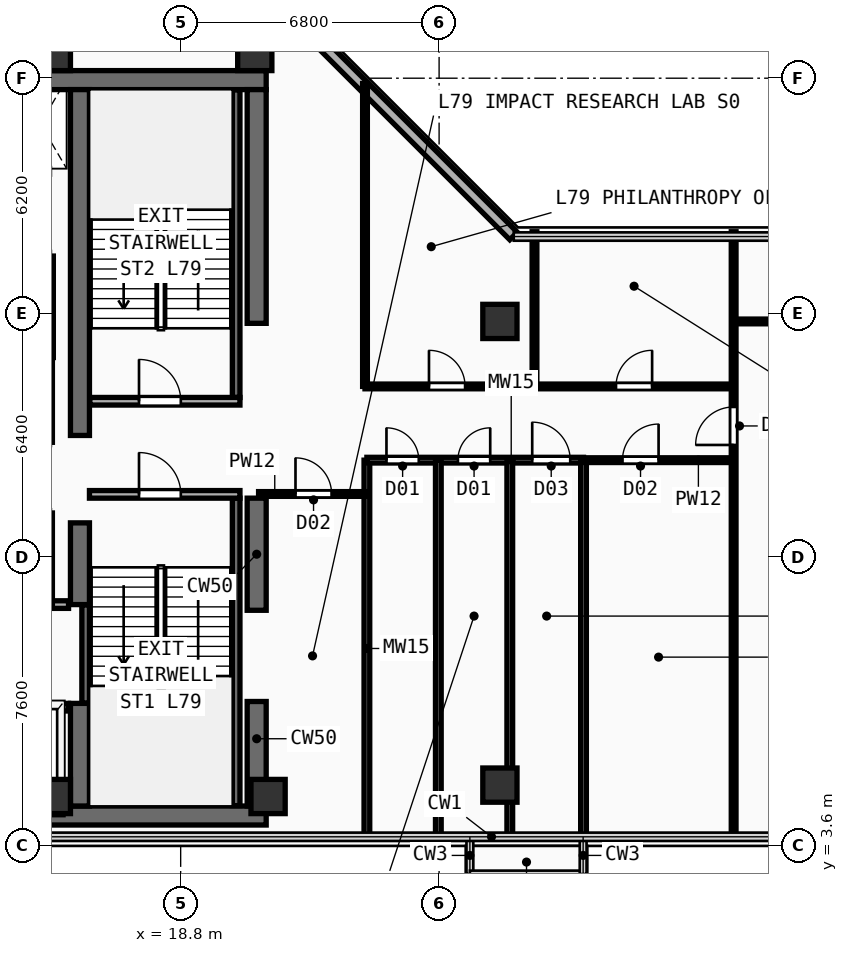
"""IFC4 building model, lengths in metres.
Left out: names, types, materials, properties, quantities, classifications, styles, units other than length and angle.
Written with IfcOpenShell. Run it as: python <this file> out.ifc"""

import sys

from ifc_helpers import new_model, si_unit, direction, frame, frame_2d, origin, origin_2d, place, context, subcontext, project, spatial, rectangle, extrude, element, fill, save


model = new_model("IFC4")
c1 = context("Model", 3, precision=1e-05, world=origin(), true_north=direction((0.0, 1.0)))
c2 = subcontext(c1, "Body", "Model", "MODEL_VIEW")
j1 = project(units=[si_unit("LENGTHUNIT", "METRE"), si_unit("PLANEANGLEUNIT", "RADIAN")], contexts=[c1])
p1 = place(None, origin())
s1 = spatial("IfcSite", under=j1, at=p1, CompositionType="ELEMENT")
p2 = place(p1, origin())
s2 = spatial("IfcBuilding", under=s1, at=p2, CompositionType="ELEMENT")
p3 = place(p2, frame((0.0, 0.0, 308.4)))
s3 = spatial("IfcBuildingStorey", under=s2, at=p3, CompositionType="ELEMENT", Elevation=308.4)
for number, where, z_axis, x_axis in (
    (1, (7.2, 4.4, 0.0), (0.0, 0.0, 1.0), (1.0, 0.0, 0.0)),
    (2, (7.2, 23.75, 0.0), (0.0, 0.0, 1.0), (1.0, 0.0, 0.0)),
):
    element("IfcWall", number, at=place(p3, frame(where, z_axis=z_axis, x_axis=x_axis)), inside=s3, PredefinedType="SHEAR", context=c2, shape_type="SweptSolid", body=[
        extrude(rectangle(XDim=13.85, YDim=0.5, at=frame_2d((6.925, 0.0))), origin(), (0.0, 0.0, 1.0), 3.56),
    ])
p4 = place(p3, frame((20.8, 4.65, 0.0), z_axis=(0.0, 0.0, 1.0), x_axis=(0.0, 1.0, 0.0)))
e3 = element("IfcWall", 3, at=p4, inside=s3, PredefinedType="SHEAR", context=c2, shape_type="SweptSolid", body=[
    extrude(rectangle(XDim=2.75, YDim=0.5, at=frame_2d((1.375, 0.0))), origin(), (0.0, 0.0, 1.0), 3.56),
])
p5 = place(p3, frame((20.8, 9.8, 0.0), z_axis=(0.0, 0.0, 1.0), x_axis=(0.0, 1.0, 0.0)))
e4 = element("IfcWall", 4, at=p5, inside=s3, PredefinedType="SHEAR", context=c2, shape_type="SweptSolid", body=[
    extrude(rectangle(XDim=2.95, YDim=0.5, at=frame_2d((1.475, 0.0))), origin(), (0.0, 0.0, 1.0), 3.56),
])
p6 = place(p3, frame((20.8, 17.35, 0.0), z_axis=(0.0, 0.0, 1.0), x_axis=(0.0, 1.0, 0.0)))
e5 = element("IfcWall", 5, at=p6, inside=s3, PredefinedType="SHEAR", context=c2, shape_type="SweptSolid", body=[
    extrude(rectangle(XDim=6.15, YDim=0.5, at=frame_2d((3.075, 0.0))), origin(), (0.0, 0.0, 1.0), 3.56),
])
p7 = place(p3, frame((16.15, 4.65, 0.0), z_axis=(0.0, 0.0, 1.0), x_axis=(0.0, 1.0, 0.0)))
e6 = element("IfcWall", 6, at=p7, inside=s3, PredefinedType="SHEAR", context=c2, shape_type="SweptSolid", body=[
    extrude(rectangle(XDim=2.7, YDim=0.5, at=frame_2d((1.35, 0.0))), origin(), (0.0, 0.0, 1.0), 3.56),
])
p8 = place(p3, frame((16.15, 9.95, 0.0), z_axis=(0.0, 0.0, 1.0), x_axis=(0.0, 1.0, 0.0)))
e7 = element("IfcWall", 7, at=p8, inside=s3, PredefinedType="SHEAR", context=c2, shape_type="SweptSolid", body=[
    extrude(rectangle(XDim=2.15, YDim=0.5, at=frame_2d((1.075, 0.0))), origin(), (0.0, 0.0, 1.0), 3.56),
])
p9 = place(p3, frame((16.15, 14.4, 0.0), z_axis=(0.0, 0.0, 1.0), x_axis=(0.0, 1.0, 0.0)))
e8 = element("IfcWall", 8, at=p9, inside=s3, PredefinedType="SHEAR", context=c2, shape_type="SweptSolid", body=[
    extrude(rectangle(XDim=9.1, YDim=0.5, at=frame_2d((4.55, 0.0))), origin(), (0.0, 0.0, 1.0), 3.56),
])
for number, where, z_axis, x_axis in (
    (9, (15.45, 4.9, 0.0), (0.0, 0.0, 1.0), (1.0, 0.0, 0.0)),
    (10, (21.1, 4.9, 0.0), (0.0, 0.0, 1.0), (1.0, 0.0, 0.0)),
    (11, (15.45, 24.45, 0.0), (0.0, 0.0, 1.0), (1.0, 0.0, 0.0)),
    (12, (20.75, 24.45, 0.0), (0.0, 0.0, 1.0), (1.0, 0.0, 0.0)),
    (13, (27.2, 5.2, 0.0), (0.0, 0.0, 1.0), (1.0, 0.0, 0.0)),
    (14, (27.2, 17.4, 0.0), (0.0, 0.0, 1.0), (1.0, 0.0, 0.0)),
):
    element("IfcColumn", number, at=place(p3, frame(where, z_axis=z_axis, x_axis=x_axis)), inside=s3, PredefinedType="COLUMN", context=c2, shape_type="SweptSolid", body=[
        extrude(rectangle(XDim=0.9, YDim=0.9, at=origin_2d()), origin(), (0.0, 0.0, 1.0), 3.56),
    ])
p10 = place(p3, frame((27.559, 19.649, 0.0), z_axis=(0.0, 0.0, 1.0), x_axis=(-0.707106781187, 0.707106781187, 0.0)))
e15 = element("IfcWall", 15, at=p10, inside=s3, PredefinedType="SOLIDWALL", context=c2, shape_type="SweptSolid", body=[
    extrude(rectangle(XDim=9.207, YDim=0.28, at=frame_2d((4.603, 0.0))), origin(), (0.0, 0.0, 1.0), 3.56),
])
p11 = place(p3, frame((16.3, 7.36, 0.0), z_axis=(0.0, 0.0, 1.0), x_axis=(0.0, 1.0, 0.0)))
e16 = element("IfcWall", 16, at=p11, inside=s3, PredefinedType="SHEAR", context=c2, shape_type="SweptSolid", body=[
    extrude(rectangle(XDim=2.58, YDim=0.2, at=frame_2d((1.29, 0.0))), origin(), (0.0, 0.0, 1.0), 3.56),
])
p12 = place(p3, frame((20.26, 4.66, 0.0), z_axis=(0.0, 0.0, 1.0), x_axis=(0.0, 1.0, 0.0)))
e17 = element("IfcWall", 17, at=p12, inside=s3, PredefinedType="SHEAR", context=c2, shape_type="SweptSolid", body=[
    extrude(rectangle(XDim=8.09, YDim=0.2, at=frame_2d((4.045, 0.0))), origin(), (0.0, 0.0, 1.0), 3.56),
])
p13 = place(p3, frame((16.4, 12.85, 0.0), z_axis=(0.0, 0.0, 1.0), x_axis=(1.0, 0.0, 0.0)))
e18 = element("IfcWall", 18, at=p13, inside=s3, PredefinedType="PARTITIONING", context=c2, shape_type="SweptSolid", body=[
    extrude(rectangle(XDim=3.96, YDim=0.2, at=frame_2d((1.98, 0.0))), origin(), (0.0, 0.0, 1.0), 3.56),
])
p14 = place(p13, frame((1.304, 0.0, 0.0)))
e19 = element("IfcOpeningElement", 19, at=p14, cuts=e18, PredefinedType="OPENING", context=c2, shape_type="SweptSolid", body=[
    extrude(rectangle(XDim=1.1, YDim=2.2, at=frame_2d((0.55, 1.1))), frame((0.0, 0.11, 0.0), z_axis=(0.0, -1.0, 0.0), x_axis=(1.0, 0.0, 0.0)), (0.0, 0.0, 1.0), 0.22),
])
p15 = place(p3, frame((20.26, 15.4, 0.0), z_axis=(0.0, 0.0, 1.0), x_axis=(0.0, 1.0, 0.0)))
e20 = element("IfcWall", 20, at=p15, inside=s3, PredefinedType="SHEAR", context=c2, shape_type="SweptSolid", body=[
    extrude(rectangle(XDim=8.09, YDim=0.2, at=frame_2d((4.045, 0.0))), origin(), (0.0, 0.0, 1.0), 3.56),
])
p16 = place(p3, frame((16.41, 15.3, 0.0), z_axis=(0.0, 0.0, 1.0), x_axis=(1.0, 0.0, 0.0)))
e21 = element("IfcWall", 21, at=p16, inside=s3, PredefinedType="PARTITIONING", context=c2, shape_type="SweptSolid", body=[
    extrude(rectangle(XDim=3.95, YDim=0.2, at=frame_2d((1.975, 0.0))), origin(), (0.0, 0.0, 1.0), 3.56),
])
p17 = place(p16, frame((1.294, 0.0, 0.0)))
e22 = element("IfcOpeningElement", 22, at=p17, cuts=e21, PredefinedType="OPENING", context=c2, shape_type="SweptSolid", body=[
    extrude(rectangle(XDim=1.1, YDim=2.2, at=frame_2d((0.55, 1.1))), frame((0.0, 0.11, 0.0), z_axis=(0.0, -1.0, 0.0), x_axis=(1.0, 0.0, 0.0)), (0.0, 0.0, 1.0), 0.22),
])
p18 = place(p3, frame((7.5, 7.25, 0.0), z_axis=(0.0, 0.0, 1.0), x_axis=(1.0, 0.0, 0.0)))
e23 = element("IfcWall", 23, at=p18, inside=s3, PredefinedType="PARTITIONING", context=c2, shape_type="SweptSolid", body=[
    extrude(rectangle(XDim=8.35, YDim=0.2, at=frame_2d((4.175, 0.0))), origin(), (0.0, 0.0, 1.0), 3.56),
])
p19 = place(p18, frame((0.53, 0.0, 0.0)))
e24 = element("IfcOpeningElement", 24, at=p19, cuts=e23, PredefinedType="OPENING", context=c2, shape_type="SweptSolid", body=[
    extrude(rectangle(XDim=1.1, YDim=2.2, at=frame_2d((0.55, 1.1))), frame((0.0, 0.11, 0.0), z_axis=(0.0, -1.0, 0.0), x_axis=(1.0, 0.0, 0.0)), (0.0, 0.0, 1.0), 0.22),
])
p20 = place(p18, frame((2.37, 0.0, 0.0)))
e25 = element("IfcOpeningElement", 25, at=p20, cuts=e23, PredefinedType="OPENING", context=c2, shape_type="SweptSolid", body=[
    extrude(rectangle(XDim=1.1, YDim=2.2, at=frame_2d((0.55, 1.1))), frame((0.0, 0.11, 0.0), z_axis=(0.0, -1.0, 0.0), x_axis=(1.0, 0.0, 0.0)), (0.0, 0.0, 1.0), 0.22),
])
p21 = place(p18, frame((4.33, 0.0, 0.0)))
e26 = element("IfcOpeningElement", 26, at=p21, cuts=e23, PredefinedType="OPENING", context=c2, shape_type="SweptSolid", body=[
    extrude(rectangle(XDim=1.1, YDim=2.2, at=frame_2d((0.55, 1.1))), frame((0.0, 0.11, 0.0), z_axis=(0.0, -1.0, 0.0), x_axis=(1.0, 0.0, 0.0)), (0.0, 0.0, 1.0), 0.22),
])
p22 = place(p18, frame((6.5, 0.0, 0.0)))
e27 = element("IfcOpeningElement", 27, at=p22, cuts=e23, PredefinedType="OPENING", context=c2, shape_type="SweptSolid", body=[
    extrude(rectangle(XDim=1.1, YDim=2.2, at=frame_2d((0.55, 1.1))), frame((0.0, 0.11, 0.0), z_axis=(0.0, -1.0, 0.0), x_axis=(1.0, 0.0, 0.0)), (0.0, 0.0, 1.0), 0.22),
])
p23 = place(p3, frame((7.5, 9.95, 0.0), z_axis=(0.0, 0.0, 1.0), x_axis=(1.0, 0.0, 0.0)))
e28 = element("IfcWall", 28, at=p23, inside=s3, PredefinedType="PARTITIONING", context=c2, shape_type="SweptSolid", body=[
    extrude(rectangle(XDim=8.35, YDim=0.2, at=frame_2d((4.175, 0.0))), origin(), (0.0, 0.0, 1.0), 3.56),
])
p24 = place(p3, frame((15.35, 9.95, 0.0), z_axis=(0.0, 0.0, 1.0), x_axis=(0.0, 1.0, 0.0)))
e29 = element("IfcWall", 29, at=p24, inside=s3, PredefinedType="PARTITIONING", context=c2, shape_type="SweptSolid", body=[
    extrude(rectangle(XDim=2.41, YDim=0.15, at=frame_2d((1.205, 0.0))), origin(), (0.0, 0.0, 1.0), 3.56),
])
p25 = place(p3, frame((15.35, 14.22, 0.0), z_axis=(0.0, 0.0, 1.0), x_axis=(0.0, 1.0, 0.0)))
e30 = element("IfcWall", 30, at=p25, inside=s3, PredefinedType="PARTITIONING", context=c2, shape_type="SweptSolid", body=[
    extrude(rectangle(XDim=2.23, YDim=0.15, at=frame_2d((1.115, 0.0))), origin(), (0.0, 0.0, 1.0), 3.56),
])
p26 = place(p3, frame((15.35, 16.45, 0.0), z_axis=(0.0, 0.0, 1.0), x_axis=(0.0, 1.0, 0.0)))
e31 = element("IfcWall", 31, at=p26, inside=s3, PredefinedType="PARTITIONING", context=c2, shape_type="SweptSolid", body=[
    extrude(rectangle(XDim=2.67, YDim=0.2, at=frame_2d((1.335, 0.0))), origin(), (0.0, 0.0, 1.0), 3.56),
])
p27 = place(p3, frame((23.7, 3.84, 0.0), z_axis=(0.0, 0.0, 1.0), x_axis=(0.0, 1.0, 0.0)))
e32 = element("IfcWall", 32, at=p27, inside=s3, PredefinedType="PLUMBINGWALL", context=c2, shape_type="SweptSolid", body=[
    extrude(rectangle(XDim=9.91, YDim=0.15, at=frame_2d((4.955, 0.0))), origin(), (0.0, 0.0, 1.0), 3.56),
])
p28 = place(p3, frame((23.7, 13.75, 0.0), z_axis=(0.0, 0.0, 1.0), x_axis=(1.0, 0.0, 0.0)))
e33 = element("IfcWall", 33, at=p28, inside=s3, PredefinedType="PLUMBINGWALL", context=c2, shape_type="SweptSolid", body=[
    extrude(rectangle(XDim=5.7, YDim=0.15, at=frame_2d((2.85, 0.0))), origin(), (0.0, 0.0, 1.0), 3.26),
])
p29 = place(p28, frame((0.515, 0.0, 0.0)))
e34 = element("IfcOpeningElement", 34, at=p29, cuts=e33, PredefinedType="OPENING", context=c2, shape_type="SweptSolid", body=[
    extrude(rectangle(XDim=0.85, YDim=2.15, at=frame_2d((0.425, 1.075))), frame((0.0, 0.085, 0.0), z_axis=(0.0, -1.0, 0.0), x_axis=(1.0, 0.0, 0.0)), (0.0, 0.0, 1.0), 0.17),
])
p30 = place(p28, frame((2.395, 0.0, 0.0)))
e35 = element("IfcOpeningElement", 35, at=p30, cuts=e33, PredefinedType="OPENING", context=c2, shape_type="SweptSolid", body=[
    extrude(rectangle(XDim=0.85, YDim=2.15, at=frame_2d((0.425, 1.075))), frame((0.0, 0.085, 0.0), z_axis=(0.0, -1.0, 0.0), x_axis=(1.0, 0.0, 0.0)), (0.0, 0.0, 1.0), 0.17),
])
p31 = place(p28, frame((4.35, 0.0, 0.0)))
e36 = element("IfcOpeningElement", 36, at=p31, cuts=e33, PredefinedType="OPENING", context=c2, shape_type="SweptSolid", body=[
    extrude(rectangle(XDim=1.0, YDim=2.2, at=frame_2d((0.5, 1.1))), frame((0.0, 0.085, 0.0), z_axis=(0.0, -1.0, 0.0), x_axis=(1.0, 0.0, 0.0)), (0.0, 0.0, 1.0), 0.17),
])
p32 = place(p3, frame((25.58, 3.84, 0.0), z_axis=(0.0, 0.0, 1.0), x_axis=(0.0, 1.0, 0.0)))
e37 = element("IfcWall", 37, at=p32, inside=s3, PredefinedType="PLUMBINGWALL", context=c2, shape_type="SweptSolid", body=[
    extrude(rectangle(XDim=9.91, YDim=0.15, at=frame_2d((4.955, 0.0))), origin(), (0.0, 0.0, 1.0), 3.56),
])
p33 = place(p3, frame((27.46, 3.84, 0.0), z_axis=(0.0, 0.0, 1.0), x_axis=(0.0, 1.0, 0.0)))
e38 = element("IfcWall", 38, at=p33, inside=s3, PredefinedType="PLUMBINGWALL", context=c2, shape_type="SweptSolid", body=[
    extrude(rectangle(XDim=9.91, YDim=0.15, at=frame_2d((4.955, 0.0))), origin(), (0.0, 0.0, 1.0), 2.96),
])
p34 = place(p3, frame((29.4, 3.84, 0.0), z_axis=(0.0, 0.0, 1.0), x_axis=(0.0, 1.0, 0.0)))
e39 = element("IfcWall", 39, at=p34, inside=s3, PredefinedType="PLUMBINGWALL", context=c2, shape_type="SweptSolid", body=[
    extrude(rectangle(XDim=9.91, YDim=0.15, at=frame_2d((4.955, 0.0))), origin(), (0.0, 0.0, 1.0), 3.56),
])
p35 = place(p3, frame((20.85, 12.86, 0.0), z_axis=(0.0, 0.0, 1.0), x_axis=(1.0, 0.0, 0.0)))
e40 = element("IfcWall", 40, at=p35, inside=s3, PredefinedType="PARTITIONING", context=c2, shape_type="SweptSolid", body=[
    extrude(rectangle(XDim=2.85, YDim=0.125, at=frame_2d((1.425, 0.0))), origin(), (0.0, 0.0, 1.0), 3.56),
])
p36 = place(p35, frame((0.971, 0.0, 0.0)))
e41 = element("IfcOpeningElement", 41, at=p36, cuts=e40, PredefinedType="OPENING", context=c2, shape_type="SweptSolid", body=[
    extrude(rectangle(XDim=0.95, YDim=2.15, at=frame_2d((0.475, 1.075))), frame((0.0, 0.073, 0.0), z_axis=(0.0, -1.0, 0.0), x_axis=(1.0, 0.0, 0.0)), (0.0, 0.0, 1.0), 0.145),
])
p37 = place(p3, frame((29.4, 13.75, 0.0), z_axis=(0.0, 0.0, 1.0), x_axis=(1.0, 0.0, 0.0)))
e42 = element("IfcWall", 42, at=p37, inside=s3, PredefinedType="PARTITIONING", context=c2, shape_type="SweptSolid", body=[
    extrude(rectangle(XDim=3.95, YDim=0.125, at=frame_2d((1.975, 0.0))), origin(), (0.0, 0.0, 1.0), 3.26),
])
p38 = place(p37, frame((1.025, 0.0, 0.0)))
e43 = element("IfcOpeningElement", 43, at=p38, cuts=e42, PredefinedType="OPENING", context=c2, shape_type="SweptSolid", body=[
    extrude(rectangle(XDim=0.95, YDim=2.15, at=frame_2d((0.475, 1.075))), frame((0.0, 0.073, 0.0), z_axis=(0.0, -1.0, 0.0), x_axis=(1.0, 0.0, 0.0)), (0.0, 0.0, 1.0), 0.145),
])
p39 = place(p3, frame((33.35, 3.84, 0.0), z_axis=(0.0, 0.0, 1.0), x_axis=(0.0, 1.0, 0.0)))
e44 = element("IfcWall", 44, at=p39, inside=s3, PredefinedType="PARTITIONING", context=c2, shape_type="SweptSolid", body=[
    extrude(rectangle(XDim=15.92, YDim=0.125, at=frame_2d((7.96, 0.0))), origin(), (0.0, 0.0, 1.0), 3.56),
])
p40 = place(p39, frame((10.31, 0.0, 0.0)))
e45 = element("IfcOpeningElement", 45, at=p40, cuts=e44, PredefinedType="OPENING", context=c2, shape_type="SweptSolid", body=[
    extrude(rectangle(XDim=1.0, YDim=2.2, at=frame_2d((0.5, 1.1))), frame((0.0, 0.073, 0.0), z_axis=(0.0, -1.0, 0.0), x_axis=(1.0, 0.0, 0.0)), (0.0, 0.0, 1.0), 0.145),
])
p41 = place(p3, frame((33.35, 17.4, 0.0), z_axis=(0.0, 0.0, 1.0), x_axis=(1.0, 0.0, 0.0)))
e46 = element("IfcWall", 46, at=p41, inside=s3, PredefinedType="PARTITIONING", context=c2, shape_type="SweptSolid", body=[
    extrude(rectangle(XDim=16.926, YDim=0.125, at=frame_2d((8.463, 0.0))), origin(), (0.0, 0.0, 1.0), 3.26),
])
p42 = place(p41, frame((1.656, 0.0, 0.0)))
e47 = element("IfcOpeningElement", 47, at=p42, cuts=e46, PredefinedType="OPENING", context=c2, shape_type="SweptSolid", body=[
    extrude(rectangle(XDim=0.95, YDim=2.15, at=frame_2d((0.475, 1.075))), frame((0.0, 0.073, 0.0), z_axis=(0.0, -1.0, 0.0), x_axis=(1.0, 0.0, 0.0)), (0.0, 0.0, 1.0), 0.145),
])
p43 = place(p3, frame((23.65, 15.69, 0.0), z_axis=(0.0, 0.0, 1.0), x_axis=(0.0, 1.0, 0.0)))
e48 = element("IfcWall", 48, at=p43, inside=s3, PredefinedType="PARTITIONING", context=c2, shape_type="SweptSolid", body=[
    extrude(rectangle(XDim=7.968, YDim=0.125, at=frame_2d((3.984, 0.0))), origin(), (0.0, 0.0, 1.0), 3.56),
])
p44 = place(p3, frame((23.65, 15.69, 0.0), z_axis=(0.0, 0.0, 1.0), x_axis=(1.0, 0.0, 0.0)))
e49 = element("IfcWall", 49, at=p44, inside=s3, PredefinedType="PARTITIONING", context=c2, shape_type="SweptSolid", body=[
    extrude(rectangle(XDim=9.7, YDim=0.125, at=frame_2d((4.85, 0.0))), origin(), (0.0, 0.0, 1.0), 3.26),
])
p45 = place(p44, frame((1.684, 0.0, 0.0)))
e50 = element("IfcOpeningElement", 50, at=p45, cuts=e49, PredefinedType="OPENING", context=c2, shape_type="SweptSolid", body=[
    extrude(rectangle(XDim=0.95, YDim=2.15, at=frame_2d((0.475, 1.075))), frame((0.0, 0.073, 0.0), z_axis=(0.0, -1.0, 0.0), x_axis=(1.0, 0.0, 0.0)), (0.0, 0.0, 1.0), 0.145),
])
p46 = place(p44, frame((6.605, 0.0, 0.0)))
e51 = element("IfcOpeningElement", 51, at=p46, cuts=e49, PredefinedType="OPENING", context=c2, shape_type="SweptSolid", body=[
    extrude(rectangle(XDim=0.95, YDim=2.15, at=frame_2d((0.475, 1.075))), frame((0.0, 0.073, 0.0), z_axis=(0.0, -1.0, 0.0), x_axis=(1.0, 0.0, 0.0)), (0.0, 0.0, 1.0), 0.145),
])
p47 = place(p3, frame((28.11, 15.69, 0.0), z_axis=(0.0, 0.0, 1.0), x_axis=(0.0, 1.0, 0.0)))
e52 = element("IfcWall", 52, at=p47, inside=s3, PredefinedType="PARTITIONING", context=c2, shape_type="SweptSolid", body=[
    extrude(rectangle(XDim=4.07, YDim=0.125, at=frame_2d((2.035, 0.0))), origin(), (0.0, 0.0, 1.0), 3.56),
])
p48 = place(p14, frame((1.1, 0.0, 0.0), z_axis=(0.0, 0.0, 1.0), x_axis=(-1.0, 0.0, 0.0)))
e53 = element("IfcDoor", 53, at=p48, inside=s3, OperationType="SINGLE_SWING_RIGHT", PredefinedType="DOOR", context=c2, shape_type="SweptSolid", body=[
    extrude(rectangle(XDim=1.1, YDim=2.2, at=frame_2d((0.55, 1.1))), frame((0.0, 0.025, 0.0), z_axis=(0.0, -1.0, 0.0), x_axis=(1.0, 0.0, 0.0)), (0.0, 0.0, 1.0), 0.05),
])
fill(e19, e53)
p49 = place(p17, origin())
e54 = element("IfcDoor", 54, at=p49, inside=s3, OperationType="SINGLE_SWING_LEFT", PredefinedType="DOOR", context=c2, shape_type="SweptSolid", body=[
    extrude(rectangle(XDim=1.1, YDim=2.2, at=frame_2d((0.55, 1.1))), frame((0.0, 0.025, 0.0), z_axis=(0.0, -1.0, 0.0), x_axis=(1.0, 0.0, 0.0)), (0.0, 0.0, 1.0), 0.05),
])
fill(e22, e54)
p50 = place(p29, origin())
e55 = element("IfcDoor", 55, at=p50, inside=s3, OperationType="SINGLE_SWING_LEFT", PredefinedType="DOOR", context=c2, shape_type="SweptSolid", body=[
    extrude(rectangle(XDim=0.85, YDim=2.15, at=frame_2d((0.425, 1.075))), frame((0.0, 0.025, 0.0), z_axis=(0.0, -1.0, 0.0), x_axis=(1.0, 0.0, 0.0)), (0.0, 0.0, 1.0), 0.05),
])
fill(e34, e55)
p51 = place(p30, origin())
e56 = element("IfcDoor", 56, at=p51, inside=s3, OperationType="SINGLE_SWING_RIGHT", PredefinedType="DOOR", context=c2, shape_type="SweptSolid", body=[
    extrude(rectangle(XDim=0.85, YDim=2.15, at=frame_2d((0.425, 1.075))), frame((0.0, 0.025, 0.0), z_axis=(0.0, -1.0, 0.0), x_axis=(1.0, 0.0, 0.0)), (0.0, 0.0, 1.0), 0.05),
])
fill(e35, e56)
p52 = place(p31, origin())
e57 = element("IfcDoor", 57, at=p52, inside=s3, OperationType="SINGLE_SWING_LEFT", PredefinedType="DOOR", context=c2, shape_type="SweptSolid", body=[
    extrude(rectangle(XDim=1.0, YDim=2.2, at=frame_2d((0.5, 1.1))), frame((0.0, 0.025, 0.0), z_axis=(0.0, -1.0, 0.0), x_axis=(1.0, 0.0, 0.0)), (0.0, 0.0, 1.0), 0.05),
])
fill(e36, e57)
p53 = place(p36, origin())
e58 = element("IfcDoor", 58, at=p53, inside=s3, OperationType="SINGLE_SWING_LEFT", PredefinedType="DOOR", context=c2, shape_type="SweptSolid", body=[
    extrude(rectangle(XDim=0.95, YDim=2.15, at=frame_2d((0.475, 1.075))), frame((0.0, 0.025, 0.0), z_axis=(0.0, -1.0, 0.0), x_axis=(1.0, 0.0, 0.0)), (0.0, 0.0, 1.0), 0.05),
])
fill(e41, e58)
p54 = place(p38, origin())
e59 = element("IfcDoor", 59, at=p54, inside=s3, OperationType="SINGLE_SWING_RIGHT", PredefinedType="DOOR", context=c2, shape_type="SweptSolid", body=[
    extrude(rectangle(XDim=0.95, YDim=2.15, at=frame_2d((0.475, 1.075))), frame((0.0, 0.025, 0.0), z_axis=(0.0, -1.0, 0.0), x_axis=(1.0, 0.0, 0.0)), (0.0, 0.0, 1.0), 0.05),
])
fill(e43, e59)
p55 = place(p40, origin())
e60 = element("IfcDoor", 60, at=p55, inside=s3, OperationType="SINGLE_SWING_LEFT", PredefinedType="DOOR", context=c2, shape_type="SweptSolid", body=[
    extrude(rectangle(XDim=1.0, YDim=2.2, at=frame_2d((0.5, 1.1))), frame((0.0, 0.025, 0.0), z_axis=(0.0, -1.0, 0.0), x_axis=(1.0, 0.0, 0.0)), (0.0, 0.0, 1.0), 0.05),
])
fill(e45, e60)
p56 = place(p45, origin())
e61 = element("IfcDoor", 61, at=p56, inside=s3, OperationType="SINGLE_SWING_LEFT", PredefinedType="DOOR", context=c2, shape_type="SweptSolid", body=[
    extrude(rectangle(XDim=0.95, YDim=2.15, at=frame_2d((0.475, 1.075))), frame((0.0, 0.025, 0.0), z_axis=(0.0, -1.0, 0.0), x_axis=(1.0, 0.0, 0.0)), (0.0, 0.0, 1.0), 0.05),
])
fill(e50, e61)
p57 = place(p46, origin())
e62 = element("IfcDoor", 62, at=p57, inside=s3, OperationType="SINGLE_SWING_RIGHT", PredefinedType="DOOR", context=c2, shape_type="SweptSolid", body=[
    extrude(rectangle(XDim=0.95, YDim=2.15, at=frame_2d((0.475, 1.075))), frame((0.0, 0.025, 0.0), z_axis=(0.0, -1.0, 0.0), x_axis=(1.0, 0.0, 0.0)), (0.0, 0.0, 1.0), 0.05),
])
fill(e51, e62)
save(model, sys.argv[1])
